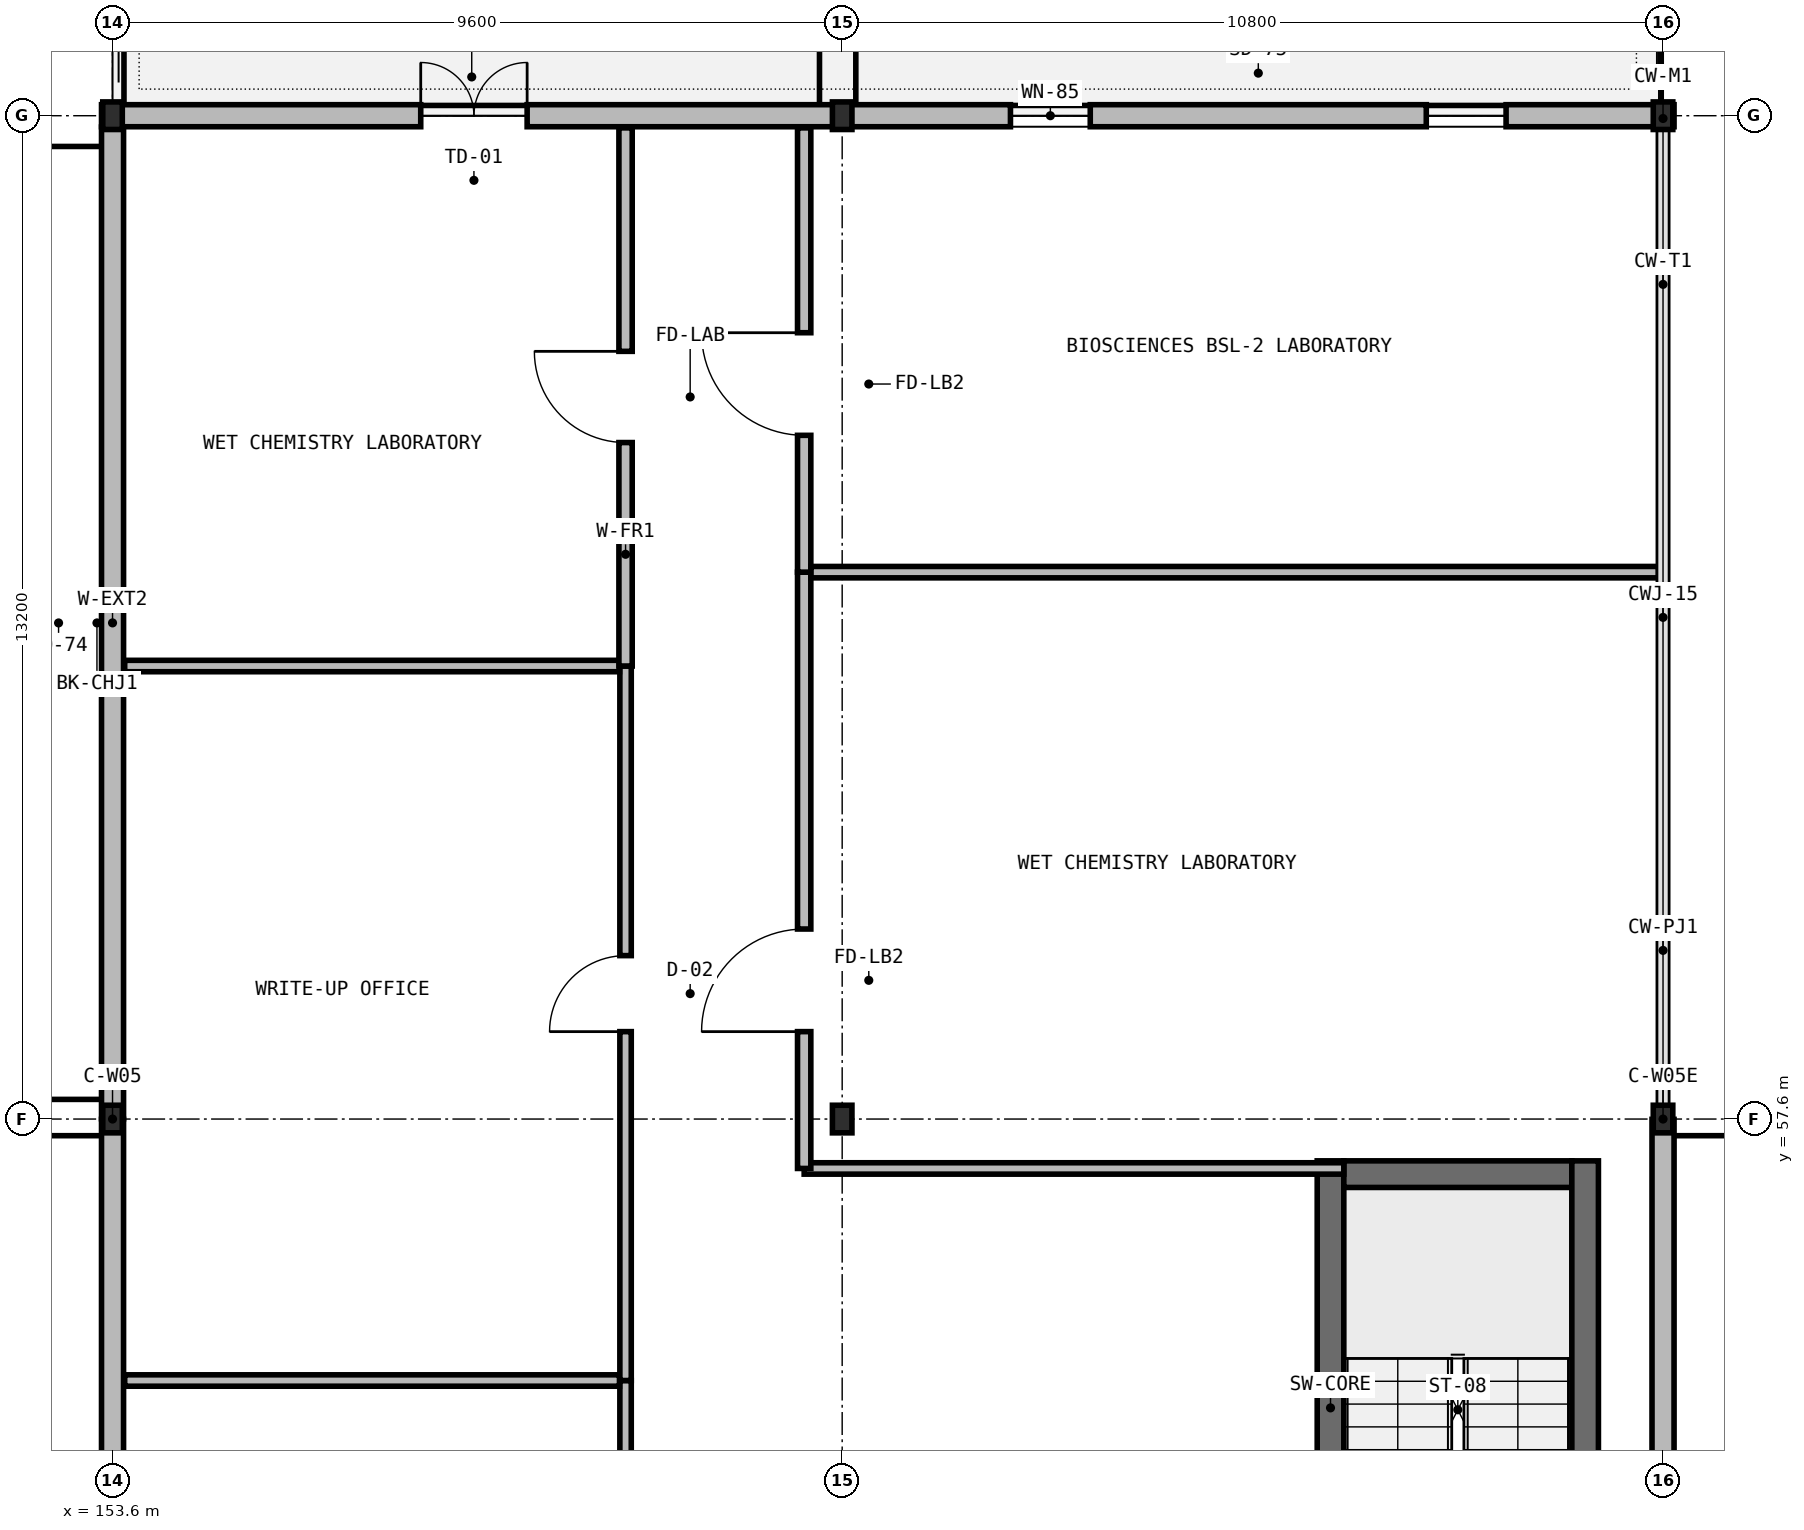
"""IFC4 building model, lengths in metres.
Left out: names, types, materials, properties, quantities, classifications, styles, units other than length and angle.
Written with IfcOpenShell. Run it as: python <this file> out.ifc"""

import sys

from ifc_helpers import new_model, si_unit, direction, frame, frame_2d, origin, origin_2d, place, context, subcontext, project, spatial, rectangle, i_section, extrude, element, fill, save


model = new_model("IFC4")
c1 = context("Model", 3, precision=1e-05, world=origin(), true_north=direction((0.0, 1.0)))
c2 = subcontext(c1, "Body", "Model", "MODEL_VIEW")
j1 = project(units=[si_unit("LENGTHUNIT", "METRE"), si_unit("PLANEANGLEUNIT", "RADIAN")], contexts=[c1])
p1 = place(None, origin())
s1 = spatial("IfcSite", under=j1, at=p1, CompositionType="ELEMENT")
p2 = place(p1, origin())
s2 = spatial("IfcBuilding", under=s1, at=p2, CompositionType="ELEMENT")
p3 = place(p2, frame((0.0, 0.0, 28.0)))
s3 = spatial("IfcBuildingStorey", under=s2, at=p3, CompositionType="ELEMENT", Elevation=28.0)
p4 = place(p3, frame((169.625, 48.85, 0.0), z_axis=(0.0, 0.0, 1.0), x_axis=(0.0, 1.0, 0.0)))
e1 = element("IfcWall", 1, at=p4, inside=s3, PredefinedType="SHEAR", context=c2, shape_type="SweptSolid", body=[
    extrude(rectangle(XDim=8.2, YDim=0.35, at=frame_2d((4.1, 0.0))), origin(), (0.0, 0.0, 1.0), 4.55),
])
p5 = place(p4, frame((0.6, 0.0, 0.0)))
e2 = element("IfcOpeningElement", 2, at=p5, cuts=e1, PredefinedType="OPENING", context=c2, shape_type="SweptSolid", body=[
    extrude(rectangle(XDim=1.1, YDim=2.15, at=frame_2d((0.55, 1.075))), frame((0.0, 0.185, 0.0), z_axis=(0.0, -1.0, 0.0), x_axis=(1.0, 0.0, 0.0)), (0.0, 0.0, 1.0), 0.37),
])
p6 = place(p3, frame((169.8, 56.875, 0.0), z_axis=(0.0, 0.0, 1.0), x_axis=(1.0, 0.0, 0.0)))
e3 = element("IfcWall", 3, at=p6, inside=s3, PredefinedType="SHEAR", context=c2, shape_type="SweptSolid", body=[
    extrude(rectangle(XDim=3.0, YDim=0.35, at=frame_2d((1.5, 0.0))), origin(), (0.0, 0.0, 1.0), 4.55),
])
p7 = place(p3, frame((172.975, 57.05, 0.0), z_axis=(0.0, 0.0, 1.0), x_axis=(0.0, -1.0, 0.0)))
e4 = element("IfcWall", 4, at=p7, inside=s3, PredefinedType="SHEAR", context=c2, shape_type="SweptSolid", body=[
    extrude(rectangle(XDim=8.2, YDim=0.35, at=frame_2d((4.1, 0.0))), origin(), (0.0, 0.0, 1.0), 4.55),
])
for number, where, z_axis, x_axis in (
    (5, (153.6, 57.6, 0.0), (0.0, 0.0, 1.0), (1.0, 0.0, 0.0)),
    (6, (153.6, 70.8, 0.0), (0.0, 0.0, 1.0), (1.0, 0.0, 0.0)),
    (7, (163.2, 57.6, 0.0), (0.0, 0.0, 1.0), (1.0, 0.0, 0.0)),
    (8, (163.2, 70.8, 0.0), (0.0, 0.0, 1.0), (1.0, 0.0, 0.0)),
    (9, (174.0, 57.6, 0.0), (0.0, 0.0, 1.0), (1.0, 0.0, 0.0)),
    (10, (174.0, 70.8, 0.0), (0.0, 0.0, 1.0), (1.0, 0.0, 0.0)),
):
    element("IfcColumn", number, at=place(p3, frame(where, z_axis=z_axis, x_axis=x_axis)), inside=s3, PredefinedType="COLUMN", context=c2, shape_type="SweptSolid", body=[
        extrude(i_section(OverallWidth=0.257, OverallDepth=0.363, WebThickness=0.013, FlangeThickness=0.022, at=origin_2d()), origin(), (0.0, 0.0, 1.0), 4.55),
    ])
p8 = place(p3, frame((153.6, 44.404, 0.0), z_axis=(0.0, 0.0, 1.0), x_axis=(0.0, 1.0, 0.0)))
e11 = element("IfcWall", 11, at=p8, inside=s3, PredefinedType="SOLIDWALL", context=c2, shape_type="SweptSolid", body=[
    extrude(rectangle(XDim=13.192, YDim=0.29, at=frame_2d((6.596, 0.0))), origin(), (0.0, 0.0, 1.0), 3.757),
])
p9 = place(p8, frame((5.356, 0.0, 0.95)))
e12 = element("IfcOpeningElement", 12, at=p9, cuts=e11, PredefinedType="OPENING", context=c2, shape_type="SweptSolid", body=[
    extrude(rectangle(XDim=2.48, YDim=1.56, at=frame_2d((1.24, 0.78))), frame((0.0, 0.155, 0.0), z_axis=(0.0, -1.0, 0.0), x_axis=(1.0, 0.0, 0.0)), (0.0, 0.0, 1.0), 0.31),
])
p10 = place(p3, frame((153.6, 57.604, 0.0), z_axis=(0.0, 0.0, 1.0), x_axis=(0.0, 1.0, 0.0)))
e13 = element("IfcWall", 13, at=p10, inside=s3, PredefinedType="SOLIDWALL", context=c2, shape_type="SweptSolid", body=[
    extrude(rectangle(XDim=13.047, YDim=0.29, at=frame_2d((6.523, 0.0))), origin(), (0.0, 0.0, 1.0), 3.757),
])
p11 = place(p3, frame((153.455, 70.8, 0.0), z_axis=(0.0, 0.0, 1.0), x_axis=(1.0, 0.0, 0.0)))
e14 = element("IfcWall", 14, at=p11, inside=s3, PredefinedType="SOLIDWALL", context=c2, shape_type="SweptSolid", body=[
    extrude(rectangle(XDim=9.741, YDim=0.29, at=frame_2d((4.871, 0.0))), origin(), (0.0, 0.0, 1.0), 3.826),
])
p12 = place(p11, frame((4.2, 0.0, 0.0)))
e15 = element("IfcOpeningElement", 15, at=p12, cuts=e14, PredefinedType="OPENING", context=c2, shape_type="SweptSolid", body=[
    extrude(rectangle(XDim=1.4, YDim=2.2, at=frame_2d((0.7, 1.1))), frame((0.0, 0.155, 0.0), z_axis=(0.0, -1.0, 0.0), x_axis=(1.0, 0.0, 0.0)), (0.0, 0.0, 1.0), 0.31),
])
p13 = place(p3, frame((163.204, 70.8, 0.0), z_axis=(0.0, 0.0, 1.0), x_axis=(1.0, 0.0, 0.0)))
e16 = element("IfcWall", 16, at=p13, inside=s3, PredefinedType="SOLIDWALL", context=c2, shape_type="SweptSolid", body=[
    extrude(rectangle(XDim=10.941, YDim=0.29, at=frame_2d((5.47, 0.0))), origin(), (0.0, 0.0, 1.0), 3.748),
])
p14 = place(p13, frame((2.21, 0.0, 0.95)))
e17 = element("IfcOpeningElement", 17, at=p14, cuts=e16, PredefinedType="OPENING", context=c2, shape_type="SweptSolid", body=[
    extrude(rectangle(XDim=1.05, YDim=1.48, at=frame_2d((0.525, 0.74))), frame((0.0, 0.155, 0.0), z_axis=(0.0, -1.0, 0.0), x_axis=(1.0, 0.0, 0.0)), (0.0, 0.0, 1.0), 0.31),
])
p15 = place(p13, frame((7.681, 0.0, 0.95)))
e18 = element("IfcOpeningElement", 18, at=p15, cuts=e16, PredefinedType="OPENING", context=c2, shape_type="SweptSolid", body=[
    extrude(rectangle(XDim=1.05, YDim=1.48, at=frame_2d((0.525, 0.74))), frame((0.0, 0.155, 0.0), z_axis=(0.0, -1.0, 0.0), x_axis=(1.0, 0.0, 0.0)), (0.0, 0.0, 1.0), 0.31),
])
p16 = place(p3, frame((174.0, 57.596, 0.0), z_axis=(0.0, 0.0, 1.0), x_axis=(0.0, -1.0, 0.0)))
e19 = element("IfcWall", 19, at=p16, inside=s3, PredefinedType="SOLIDWALL", context=c2, shape_type="SweptSolid", body=[
    extrude(rectangle(XDim=13.192, YDim=0.29, at=frame_2d((6.596, 0.0))), origin(), (0.0, 0.0, 1.0), 3.829),
])
p17 = place(p16, frame((5.741, 0.0, 0.95)))
e20 = element("IfcOpeningElement", 20, at=p17, cuts=e19, PredefinedType="OPENING", context=c2, shape_type="SweptSolid", body=[
    extrude(rectangle(XDim=1.71, YDim=1.8, at=frame_2d((0.855, 0.9))), frame((0.0, 0.155, 0.0), z_axis=(0.0, -1.0, 0.0), x_axis=(1.0, 0.0, 0.0)), (0.0, 0.0, 1.0), 0.31),
])
p18 = place(p3, frame((160.35, 47.36, 0.0), z_axis=(0.0, 0.0, 1.0), x_axis=(0.0, 1.0, 0.0)))
e21 = element("IfcWall", 21, at=p18, inside=s3, PredefinedType="PARTITIONING", context=c2, shape_type="SweptSolid", body=[
    extrude(rectangle(XDim=6.8, YDim=0.15, at=frame_2d((3.4, 0.0))), origin(), (0.0, 0.0, 1.0), 4.3),
])
p19 = place(p18, frame((2.9, 0.0, 0.0)))
e22 = element("IfcOpeningElement", 22, at=p19, cuts=e21, PredefinedType="OPENING", context=c2, shape_type="SweptSolid", body=[
    extrude(rectangle(XDim=1.0, YDim=2.2, at=frame_2d((0.5, 1.1))), frame((0.0, 0.085, 0.0), z_axis=(0.0, -1.0, 0.0), x_axis=(1.0, 0.0, 0.0)), (0.0, 0.0, 1.0), 0.17),
])
p20 = place(p3, frame((153.76, 54.16, 0.0), z_axis=(0.0, 0.0, 1.0), x_axis=(1.0, 0.0, 0.0)))
e23 = element("IfcWall", 23, at=p20, inside=s3, PredefinedType="PARTITIONING", context=c2, shape_type="SweptSolid", body=[
    extrude(rectangle(XDim=6.51, YDim=0.15, at=frame_2d((3.255, 0.0))), origin(), (0.0, 0.0, 1.0), 4.3),
])
p21 = place(p3, frame((160.35, 54.16, 0.0), z_axis=(0.0, 0.0, 1.0), x_axis=(0.0, 1.0, 0.0)))
e24 = element("IfcWall", 24, at=p21, inside=s3, PredefinedType="PARTITIONING", context=c2, shape_type="SweptSolid", body=[
    extrude(rectangle(XDim=9.4, YDim=0.15, at=frame_2d((4.7, 0.0))), origin(), (0.0, 0.0, 1.0), 4.3),
])
p22 = place(p21, frame((4.59, 0.0, 0.0)))
e25 = element("IfcOpeningElement", 25, at=p22, cuts=e24, PredefinedType="OPENING", context=c2, shape_type="SweptSolid", body=[
    extrude(rectangle(XDim=1.0, YDim=2.2, at=frame_2d((0.5, 1.1))), frame((0.0, 0.085, 0.0), z_axis=(0.0, -1.0, 0.0), x_axis=(1.0, 0.0, 0.0)), (0.0, 0.0, 1.0), 0.17),
])
p23 = place(p3, frame((153.76, 63.56, 0.0), z_axis=(0.0, 0.0, 1.0), x_axis=(1.0, 0.0, 0.0)))
e26 = element("IfcWall", 26, at=p23, inside=s3, PredefinedType="PARTITIONING", context=c2, shape_type="SweptSolid", body=[
    extrude(rectangle(XDim=6.51, YDim=0.15, at=frame_2d((3.255, 0.0))), origin(), (0.0, 0.0, 1.0), 4.3),
])
p24 = place(p3, frame((160.35, 63.56, 0.0), z_axis=(0.0, 0.0, 1.0), x_axis=(0.0, 1.0, 0.0)))
e27 = element("IfcWall", 27, at=p24, inside=s3, PredefinedType="PARTITIONING", context=c2, shape_type="SweptSolid", body=[
    extrude(rectangle(XDim=7.08, YDim=0.175, at=frame_2d((3.54, 0.0))), origin(), (0.0, 0.0, 1.0), 4.3),
])
p25 = place(p24, frame((2.94, 0.0, 0.0)))
e28 = element("IfcOpeningElement", 28, at=p25, cuts=e27, PredefinedType="OPENING", context=c2, shape_type="SweptSolid", body=[
    extrude(rectangle(XDim=1.2, YDim=2.2, at=frame_2d((0.6, 1.1))), frame((0.0, 0.097, 0.0), z_axis=(0.0, -1.0, 0.0), x_axis=(1.0, 0.0, 0.0)), (0.0, 0.0, 1.0), 0.195),
])
p26 = place(p3, frame((162.7, 56.95, 0.0), z_axis=(0.0, 0.0, 1.0), x_axis=(1.0, 0.0, 0.0)))
e29 = element("IfcWall", 29, at=p26, inside=s3, PredefinedType="PARTITIONING", context=c2, shape_type="SweptSolid", body=[
    extrude(rectangle(XDim=7.1, YDim=0.15, at=frame_2d((3.55, 0.0))), origin(), (0.0, 0.0, 1.0), 4.3),
])
p27 = place(p3, frame((162.7, 56.95, 0.0), z_axis=(0.0, 0.0, 1.0), x_axis=(0.0, 1.0, 0.0)))
e30 = element("IfcWall", 30, at=p27, inside=s3, PredefinedType="PARTITIONING", context=c2, shape_type="SweptSolid", body=[
    extrude(rectangle(XDim=7.845, YDim=0.175, at=frame_2d((3.922, 0.0))), origin(), (0.0, 0.0, 1.0), 4.3),
])
p28 = place(p27, frame((1.8, 0.0, 0.0)))
e31 = element("IfcOpeningElement", 31, at=p28, cuts=e30, PredefinedType="OPENING", context=c2, shape_type="SweptSolid", body=[
    extrude(rectangle(XDim=1.35, YDim=2.2, at=frame_2d((0.675, 1.1))), frame((0.0, 0.097, 0.0), z_axis=(0.0, -1.0, 0.0), x_axis=(1.0, 0.0, 0.0)), (0.0, 0.0, 1.0), 0.195),
])
p29 = place(p3, frame((162.7, 64.795, 0.0), z_axis=(0.0, 0.0, 1.0), x_axis=(0.0, 1.0, 0.0)))
e32 = element("IfcWall", 32, at=p29, inside=s3, PredefinedType="PARTITIONING", context=c2, shape_type="SweptSolid", body=[
    extrude(rectangle(XDim=5.845, YDim=0.175, at=frame_2d((2.922, 0.0))), origin(), (0.0, 0.0, 1.0), 4.3),
])
p30 = place(p29, frame((1.8, 0.0, 0.0)))
e33 = element("IfcOpeningElement", 33, at=p30, cuts=e32, PredefinedType="OPENING", context=c2, shape_type="SweptSolid", body=[
    extrude(rectangle(XDim=1.35, YDim=2.2, at=frame_2d((0.675, 1.1))), frame((0.0, 0.097, 0.0), z_axis=(0.0, -1.0, 0.0), x_axis=(1.0, 0.0, 0.0)), (0.0, 0.0, 1.0), 0.195),
])
p31 = place(p3, frame((162.79, 64.795, 0.0), z_axis=(0.0, 0.0, 1.0), x_axis=(1.0, 0.0, 0.0)))
e34 = element("IfcWall", 34, at=p31, inside=s3, PredefinedType="PARTITIONING", context=c2, shape_type="SweptSolid", body=[
    extrude(rectangle(XDim=11.15, YDim=0.15, at=frame_2d((5.575, 0.0))), origin(), (0.0, 0.0, 1.0), 4.3),
])
p32 = place(p12, origin())
e35 = element("IfcDoor", 35, at=p32, inside=s3, OperationType="DOUBLE_DOOR_SINGLE_SWING", PredefinedType="DOOR", context=c2, shape_type="SweptSolid", body=[
    extrude(rectangle(XDim=1.4, YDim=2.2, at=frame_2d((0.7, 1.1))), frame((0.0, 0.025, 0.0), z_axis=(0.0, -1.0, 0.0), x_axis=(1.0, 0.0, 0.0)), (0.0, 0.0, 1.0), 0.05),
])
fill(e15, e35)
p33 = place(p14, origin())
e36 = element("IfcWindow", 36, at=p33, inside=s3, PartitioningType="SINGLE_PANEL", PredefinedType="WINDOW", context=c2, shape_type="SweptSolid", body=[
    extrude(rectangle(XDim=1.05, YDim=1.48, at=frame_2d((0.525, 0.74))), frame((0.0, 0.03, 0.0), z_axis=(0.0, -1.0, 0.0), x_axis=(1.0, 0.0, 0.0)), (0.0, 0.0, 1.0), 0.06),
])
fill(e17, e36)
p34 = place(p15, origin())
e37 = element("IfcWindow", 37, at=p34, inside=s3, PartitioningType="SINGLE_PANEL", PredefinedType="WINDOW", context=c2, shape_type="SweptSolid", body=[
    extrude(rectangle(XDim=1.05, YDim=1.48, at=frame_2d((0.525, 0.74))), frame((0.0, 0.03, 0.0), z_axis=(0.0, -1.0, 0.0), x_axis=(1.0, 0.0, 0.0)), (0.0, 0.0, 1.0), 0.06),
])
fill(e18, e37)
p35 = place(p22, origin())
e38 = element("IfcDoor", 38, at=p35, inside=s3, OperationType="SINGLE_SWING_LEFT", PredefinedType="DOOR", context=c2, shape_type="SweptSolid", body=[
    extrude(rectangle(XDim=1.0, YDim=2.2, at=frame_2d((0.5, 1.1))), frame((0.0, 0.025, 0.0), z_axis=(0.0, -1.0, 0.0), x_axis=(1.0, 0.0, 0.0)), (0.0, 0.0, 1.0), 0.05),
])
fill(e25, e38)
p36 = place(p25, origin())
e39 = element("IfcDoor", 39, at=p36, inside=s3, OperationType="SINGLE_SWING_RIGHT", PredefinedType="DOOR", context=c2, shape_type="SweptSolid", body=[
    extrude(rectangle(XDim=1.2, YDim=2.2, at=frame_2d((0.6, 1.1))), frame((0.0, 0.025, 0.0), z_axis=(0.0, -1.0, 0.0), x_axis=(1.0, 0.0, 0.0)), (0.0, 0.0, 1.0), 0.05),
])
fill(e28, e39)
p37 = place(p28, origin())
e40 = element("IfcDoor", 40, at=p37, inside=s3, OperationType="SINGLE_SWING_LEFT", PredefinedType="DOOR", context=c2, shape_type="SweptSolid", body=[
    extrude(rectangle(XDim=1.35, YDim=2.2, at=frame_2d((0.675, 1.1))), frame((0.0, 0.025, 0.0), z_axis=(0.0, -1.0, 0.0), x_axis=(1.0, 0.0, 0.0)), (0.0, 0.0, 1.0), 0.05),
])
fill(e31, e40)
p38 = place(p30, origin())
e41 = element("IfcDoor", 41, at=p38, inside=s3, OperationType="SINGLE_SWING_RIGHT", PredefinedType="DOOR", context=c2, shape_type="SweptSolid", body=[
    extrude(rectangle(XDim=1.35, YDim=2.2, at=frame_2d((0.675, 1.1))), frame((0.0, 0.025, 0.0), z_axis=(0.0, -1.0, 0.0), x_axis=(1.0, 0.0, 0.0)), (0.0, 0.0, 1.0), 0.05),
])
fill(e33, e41)
save(model, sys.argv[1])
